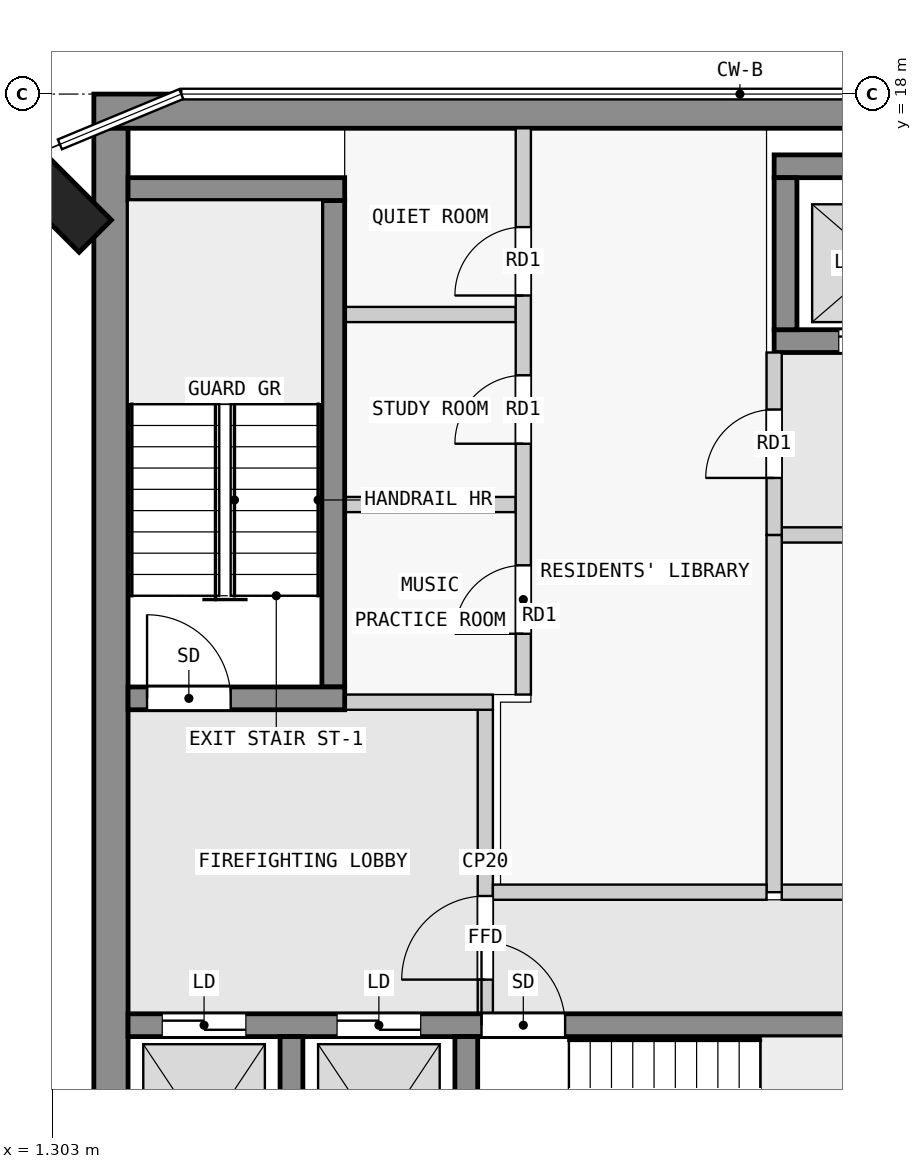
"""IFC4 building model, lengths in metres.
Left out: names, types, materials, properties, quantities, classifications, styles, units other than length and angle.
Written with IfcOpenShell. Run it as: python <this file> out.ifc"""

import sys

from ifc_helpers import new_model, si_unit, direction, frame, frame_2d, origin, origin_2d, place, context, subcontext, project, spatial, rectangle, extrude, element, fill, save


model = new_model("IFC4")
c1 = context("Model", 3, precision=1e-05, world=origin(), true_north=direction((0.0, 1.0)))
c2 = subcontext(c1, "Body", "Model", "MODEL_VIEW")
j1 = project(units=[si_unit("LENGTHUNIT", "METRE"), si_unit("PLANEANGLEUNIT", "RADIAN")], contexts=[c1])
p1 = place(None, origin())
s1 = spatial("IfcSite", under=j1, at=p1, CompositionType="ELEMENT")
p2 = place(p1, origin())
s2 = spatial("IfcBuilding", under=s1, at=p2, CompositionType="ELEMENT")
p3 = place(p2, frame((0.0, 0.0, 266.9)))
s3 = spatial("IfcBuildingStorey", under=s2, at=p3, CompositionType="ELEMENT", Elevation=266.9)
p4 = place(p3, frame((1.374, 16.626, 0.0), z_axis=(0.0, 0.0, 1.0), x_axis=(0.707106781187, 0.707106781187, 0.0)))
e1 = element("IfcColumn", 1, at=p4, inside=s3, PredefinedType="COLUMN", context=c2, shape_type="SweptSolid", body=[
    extrude(rectangle(XDim=0.6, YDim=1.4, at=origin_2d()), origin(), (0.0, 0.0, 1.0), 3.5),
])
p5 = place(p3, frame((1.85, 17.775, 0.0), z_axis=(0.0, 0.0, 1.0), x_axis=(1.0, 0.0, 0.0)))
e2 = element("IfcWall", 2, at=p5, inside=s3, PredefinedType="SHEAR", context=c2, shape_type="SweptSolid", body=[
    extrude(rectangle(XDim=20.65, YDim=0.45, at=frame_2d((10.325, 0.0))), origin(), (0.0, 0.0, 1.0), 3.25),
])
p6 = place(p3, frame((2.075, 2.5, 0.0), z_axis=(0.0, 0.0, 1.0), x_axis=(0.0, 1.0, 0.0)))
e3 = element("IfcWall", 3, at=p6, inside=s3, PredefinedType="SHEAR", context=c2, shape_type="SweptSolid", body=[
    extrude(rectangle(XDim=15.05, YDim=0.45, at=frame_2d((7.525, 0.0))), origin(), (0.0, 0.0, 1.0), 3.25),
])
for number, where, z_axis, x_axis in (
    (4, (4.45, 2.8, 0.0), (0.0, 0.0, 1.0), (0.0, 1.0, 0.0)),
    (5, (6.75, 2.8, 0.0), (0.0, 0.0, 1.0), (0.0, 1.0, 0.0)),
):
    element("IfcWall", number, at=place(p3, frame(where, z_axis=z_axis, x_axis=x_axis)), inside=s3, PredefinedType="SHEAR", context=c2, shape_type="SweptSolid", body=[
        extrude(rectangle(XDim=2.8, YDim=0.3, at=frame_2d((1.4, 0.0))), origin(), (0.0, 0.0, 1.0), 3.25),
    ])
p7 = place(p3, frame((2.3, 5.75, 0.0), z_axis=(0.0, 0.0, 1.0), x_axis=(1.0, 0.0, 0.0)))
e6 = element("IfcWall", 6, at=p7, inside=s3, PredefinedType="SHEAR", context=c2, shape_type="SweptSolid", body=[
    extrude(rectangle(XDim=18.8, YDim=0.3, at=frame_2d((9.4, 0.0))), origin(), (0.0, 0.0, 1.0), 3.25),
])
p8 = place(p7, frame((4.65, 0.0, 0.0)))
e7 = element("IfcOpeningElement", 7, at=p8, cuts=e6, PredefinedType="OPENING", context=c2, shape_type="SweptSolid", body=[
    extrude(rectangle(XDim=1.1, YDim=2.1, at=frame_2d((0.55, 1.05))), frame((0.0, 0.16, 0.0), z_axis=(0.0, -1.0, 0.0), x_axis=(1.0, 0.0, 0.0)), (0.0, 0.0, 1.0), 0.32),
])
p9 = place(p7, frame((0.45, 0.0, 0.0)))
e8 = element("IfcOpeningElement", 8, at=p9, cuts=e6, PredefinedType="OPENING", context=c2, shape_type="SweptSolid", body=[
    extrude(rectangle(XDim=1.1, YDim=2.1, at=frame_2d((0.55, 1.05))), frame((0.0, 0.16, 0.0), z_axis=(0.0, -1.0, 0.0), x_axis=(1.0, 0.0, 0.0)), (0.0, 0.0, 1.0), 0.32),
])
p10 = place(p7, frame((2.75, 0.0, 0.0)))
e9 = element("IfcOpeningElement", 9, at=p10, cuts=e6, PredefinedType="OPENING", context=c2, shape_type="SweptSolid", body=[
    extrude(rectangle(XDim=1.1, YDim=2.1, at=frame_2d((0.55, 1.05))), frame((0.0, 0.16, 0.0), z_axis=(0.0, -1.0, 0.0), x_axis=(1.0, 0.0, 0.0)), (0.0, 0.0, 1.0), 0.32),
])
p11 = place(p7, frame((11.95, 0.0, 0.0)))
e10 = element("IfcOpeningElement", 10, at=p11, cuts=e6, PredefinedType="OPENING", context=c2, shape_type="SweptSolid", body=[
    extrude(rectangle(XDim=0.9, YDim=2.1, at=frame_2d((0.45, 1.05))), frame((0.0, 0.16, 0.0), z_axis=(0.0, -1.0, 0.0), x_axis=(1.0, 0.0, 0.0)), (0.0, 0.0, 1.0), 0.32),
])
p12 = place(p7, frame((15.7, 0.0, 0.0)))
e11 = element("IfcOpeningElement", 11, at=p12, cuts=e6, PredefinedType="OPENING", context=c2, shape_type="SweptSolid", body=[
    extrude(rectangle(XDim=0.9, YDim=2.1, at=frame_2d((0.45, 1.05))), frame((0.0, 0.16, 0.0), z_axis=(0.0, -1.0, 0.0), x_axis=(1.0, 0.0, 0.0)), (0.0, 0.0, 1.0), 0.32),
])
p13 = place(p3, frame((2.3, 10.05, 0.0), z_axis=(0.0, 0.0, 1.0), x_axis=(1.0, 0.0, 0.0)))
e12 = element("IfcWall", 12, at=p13, inside=s3, PredefinedType="SHEAR", context=c2, shape_type="SweptSolid", body=[
    extrude(rectangle(XDim=2.85, YDim=0.3, at=frame_2d((1.425, 0.0))), origin(), (0.0, 0.0, 1.0), 3.25),
])
p14 = place(p13, frame((0.25, 0.0, 0.0)))
e13 = element("IfcOpeningElement", 13, at=p14, cuts=e12, PredefinedType="OPENING", context=c2, shape_type="SweptSolid", body=[
    extrude(rectangle(XDim=1.1, YDim=2.1, at=frame_2d((0.55, 1.05))), frame((0.0, 0.16, 0.0), z_axis=(0.0, -1.0, 0.0), x_axis=(1.0, 0.0, 0.0)), (0.0, 0.0, 1.0), 0.32),
])
p15 = place(p3, frame((5.0, 10.2, 0.0), z_axis=(0.0, 0.0, 1.0), x_axis=(0.0, 1.0, 0.0)))
e14 = element("IfcWall", 14, at=p15, inside=s3, PredefinedType="SHEAR", context=c2, shape_type="SweptSolid", body=[
    extrude(rectangle(XDim=6.4, YDim=0.3, at=frame_2d((3.2, 0.0))), origin(), (0.0, 0.0, 1.0), 3.25),
])
p16 = place(p3, frame((2.3, 16.75, 0.0), z_axis=(0.0, 0.0, 1.0), x_axis=(1.0, 0.0, 0.0)))
e15 = element("IfcWall", 15, at=p16, inside=s3, PredefinedType="SHEAR", context=c2, shape_type="SweptSolid", body=[
    extrude(rectangle(XDim=2.85, YDim=0.3, at=frame_2d((1.425, 0.0))), origin(), (0.0, 0.0, 1.0), 3.25),
])
p17 = place(p3, frame((10.8, 17.05, 0.0), z_axis=(0.0, 0.0, 1.0), x_axis=(1.0, 0.0, 0.0)))
e16 = element("IfcWall", 16, at=p17, inside=s3, PredefinedType="SHEAR", context=c2, shape_type="SweptSolid", body=[
    extrude(rectangle(XDim=7.8, YDim=0.3, at=frame_2d((3.9, 0.0))), origin(), (0.0, 0.0, 1.0), 3.25),
])
p18 = place(p3, frame((10.8, 14.75, 0.0), z_axis=(0.0, 0.0, 1.0), x_axis=(1.0, 0.0, 0.0)))
e17 = element("IfcWall", 17, at=p18, inside=s3, PredefinedType="SHEAR", context=c2, shape_type="SweptSolid", body=[
    extrude(rectangle(XDim=7.8, YDim=0.3, at=frame_2d((3.9, 0.0))), origin(), (0.0, 0.0, 1.0), 3.25),
])
p19 = place(p18, frame((0.85, 0.0, 0.0)))
e18 = element("IfcOpeningElement", 18, at=p19, cuts=e17, PredefinedType="OPENING", context=c2, shape_type="SweptSolid", body=[
    extrude(rectangle(XDim=1.1, YDim=2.1, at=frame_2d((0.55, 1.05))), frame((0.0, 0.16, 0.0), z_axis=(0.0, -1.0, 0.0), x_axis=(1.0, 0.0, 0.0)), (0.0, 0.0, 1.0), 0.32),
])
p20 = place(p18, frame((3.35, 0.0, 0.0)))
e19 = element("IfcOpeningElement", 19, at=p20, cuts=e17, PredefinedType="OPENING", context=c2, shape_type="SweptSolid", body=[
    extrude(rectangle(XDim=1.1, YDim=2.1, at=frame_2d((0.55, 1.05))), frame((0.0, 0.16, 0.0), z_axis=(0.0, -1.0, 0.0), x_axis=(1.0, 0.0, 0.0)), (0.0, 0.0, 1.0), 0.32),
])
p21 = place(p18, frame((5.85, 0.0, 0.0)))
e20 = element("IfcOpeningElement", 20, at=p21, cuts=e17, PredefinedType="OPENING", context=c2, shape_type="SweptSolid", body=[
    extrude(rectangle(XDim=1.1, YDim=2.1, at=frame_2d((0.55, 1.05))), frame((0.0, 0.16, 0.0), z_axis=(0.0, -1.0, 0.0), x_axis=(1.0, 0.0, 0.0)), (0.0, 0.0, 1.0), 0.32),
])
p22 = place(p3, frame((10.95, 14.9, 0.0), z_axis=(0.0, 0.0, 1.0), x_axis=(0.0, 1.0, 0.0)))
e21 = element("IfcWall", 21, at=p22, inside=s3, PredefinedType="SHEAR", context=c2, shape_type="SweptSolid", body=[
    extrude(rectangle(XDim=2.0, YDim=0.3, at=frame_2d((1.0, 0.0))), origin(), (0.0, 0.0, 1.0), 3.25),
])
p23 = place(p3, frame((7.0, 5.9, 0.0), z_axis=(0.0, 0.0, 1.0), x_axis=(0.0, 1.0, 0.0)))
e22 = element("IfcWall", 22, at=p23, inside=s3, PredefinedType="PARTITIONING", context=c2, shape_type="SweptSolid", body=[
    extrude(rectangle(XDim=4.0, YDim=0.2, at=frame_2d((2.0, 0.0))), origin(), (0.0, 0.0, 1.0), 3.25),
])
p24 = place(p23, frame((0.45, 0.0, 0.0)))
e23 = element("IfcOpeningElement", 23, at=p24, cuts=e22, PredefinedType="OPENING", context=c2, shape_type="SweptSolid", body=[
    extrude(rectangle(XDim=1.1, YDim=2.1, at=frame_2d((0.55, 1.05))), frame((0.0, 0.11, 0.0), z_axis=(0.0, -1.0, 0.0), x_axis=(1.0, 0.0, 0.0)), (0.0, 0.0, 1.0), 0.22),
])
p25 = place(p3, frame((5.15, 10.0, 0.0), z_axis=(0.0, 0.0, 1.0), x_axis=(1.0, 0.0, 0.0)))
e24 = element("IfcWall", 24, at=p25, inside=s3, PredefinedType="PARTITIONING", context=c2, shape_type="SweptSolid", body=[
    extrude(rectangle(XDim=1.95, YDim=0.2, at=frame_2d((0.975, 0.0))), origin(), (0.0, 0.0, 1.0), 3.25),
])
p26 = place(p3, frame((7.1, 7.5, 0.0), z_axis=(0.0, 0.0, 1.0), x_axis=(1.0, 0.0, 0.0)))
e25 = element("IfcWall", 25, at=p26, inside=s3, PredefinedType="PARTITIONING", context=c2, shape_type="SweptSolid", body=[
    extrude(rectangle(XDim=3.6, YDim=0.2, at=frame_2d((1.8, 0.0))), origin(), (0.0, 0.0, 1.0), 3.25),
])
p27 = place(p3, frame((10.8, 12.2, 0.0), z_axis=(0.0, 0.0, 1.0), x_axis=(0.0, 1.0, 0.0)))
e26 = element("IfcWall", 26, at=p27, inside=s3, PredefinedType="PARTITIONING", context=c2, shape_type="SweptSolid", body=[
    extrude(rectangle(XDim=2.4, YDim=0.2, at=frame_2d((1.2, 0.0))), origin(), (0.0, 0.0, 1.0), 3.25),
])
p28 = place(p27, frame((0.75, 0.0, 0.0)))
e27 = element("IfcOpeningElement", 27, at=p28, cuts=e26, PredefinedType="OPENING", context=c2, shape_type="SweptSolid", body=[
    extrude(rectangle(XDim=0.9, YDim=2.1, at=frame_2d((0.45, 1.05))), frame((0.0, 0.11, 0.0), z_axis=(0.0, -1.0, 0.0), x_axis=(1.0, 0.0, 0.0)), (0.0, 0.0, 1.0), 0.22),
])
p29 = place(p3, frame((10.8, 7.5, 0.0), z_axis=(0.0, 0.0, 1.0), x_axis=(0.0, 1.0, 0.0)))
e28 = element("IfcWall", 28, at=p29, inside=s3, PredefinedType="PARTITIONING", context=c2, shape_type="SweptSolid", body=[
    extrude(rectangle(XDim=4.7, YDim=0.2, at=frame_2d((2.35, 0.0))), origin(), (0.0, 0.0, 1.0), 3.25),
])
p30 = place(p3, frame((10.9, 7.5, 0.0), z_axis=(0.0, 0.0, 1.0), x_axis=(1.0, 0.0, 0.0)))
e29 = element("IfcWall", 29, at=p30, inside=s3, PredefinedType="PARTITIONING", context=c2, shape_type="SweptSolid", body=[
    extrude(rectangle(XDim=8.65, YDim=0.2, at=frame_2d((4.325, 0.0))), origin(), (0.0, 0.0, 1.0), 3.25),
])
p31 = place(p3, frame((10.9, 12.2, 0.0), z_axis=(0.0, 0.0, 1.0), x_axis=(1.0, 0.0, 0.0)))
e30 = element("IfcWall", 30, at=p31, inside=s3, PredefinedType="PARTITIONING", context=c2, shape_type="SweptSolid", body=[
    extrude(rectangle(XDim=8.65, YDim=0.2, at=frame_2d((4.325, 0.0))), origin(), (0.0, 0.0, 1.0), 3.25),
])
p32 = place(p31, frame((1.45, 0.0, 0.0)))
e31 = element("IfcOpeningElement", 31, at=p32, cuts=e30, PredefinedType="OPENING", context=c2, shape_type="SweptSolid", body=[
    extrude(rectangle(XDim=0.9, YDim=2.1, at=frame_2d((0.45, 1.05))), frame((0.0, 0.11, 0.0), z_axis=(0.0, -1.0, 0.0), x_axis=(1.0, 0.0, 0.0)), (0.0, 0.0, 1.0), 0.22),
])
p33 = place(p31, frame((5.875, 0.0, 0.0)))
e32 = element("IfcOpeningElement", 32, at=p33, cuts=e30, PredefinedType="OPENING", context=c2, shape_type="SweptSolid", body=[
    extrude(rectangle(XDim=0.9, YDim=2.1, at=frame_2d((0.45, 1.05))), frame((0.0, 0.11, 0.0), z_axis=(0.0, -1.0, 0.0), x_axis=(1.0, 0.0, 0.0)), (0.0, 0.0, 1.0), 0.22),
])
p34 = place(p3, frame((7.5, 10.1, 0.0), z_axis=(0.0, 0.0, 1.0), x_axis=(0.0, 1.0, 0.0)))
e33 = element("IfcWall", 33, at=p34, inside=s3, PredefinedType="PARTITIONING", context=c2, shape_type="SweptSolid", body=[
    extrude(rectangle(XDim=7.45, YDim=0.2, at=frame_2d((3.725, 0.0))), origin(), (0.0, 0.0, 1.0), 3.25),
])
p35 = place(p34, frame((0.8, 0.0, 0.0)))
e34 = element("IfcOpeningElement", 34, at=p35, cuts=e33, PredefinedType="OPENING", context=c2, shape_type="SweptSolid", body=[
    extrude(rectangle(XDim=0.9, YDim=2.1, at=frame_2d((0.45, 1.05))), frame((0.0, 0.11, 0.0), z_axis=(0.0, -1.0, 0.0), x_axis=(1.0, 0.0, 0.0)), (0.0, 0.0, 1.0), 0.22),
])
p36 = place(p34, frame((3.3, 0.0, 0.0)))
e35 = element("IfcOpeningElement", 35, at=p36, cuts=e33, PredefinedType="OPENING", context=c2, shape_type="SweptSolid", body=[
    extrude(rectangle(XDim=0.9, YDim=2.1, at=frame_2d((0.45, 1.05))), frame((0.0, 0.11, 0.0), z_axis=(0.0, -1.0, 0.0), x_axis=(1.0, 0.0, 0.0)), (0.0, 0.0, 1.0), 0.22),
])
p37 = place(p34, frame((5.25, 0.0, 0.0)))
e36 = element("IfcOpeningElement", 36, at=p37, cuts=e33, PredefinedType="OPENING", context=c2, shape_type="SweptSolid", body=[
    extrude(rectangle(XDim=0.9, YDim=2.1, at=frame_2d((0.45, 1.05))), frame((0.0, 0.11, 0.0), z_axis=(0.0, -1.0, 0.0), x_axis=(1.0, 0.0, 0.0)), (0.0, 0.0, 1.0), 0.22),
])
for number, where, z_axis, x_axis in (
    (37, (5.15, 12.6, 0.0), (0.0, 0.0, 1.0), (1.0, 0.0, 0.0)),
    (38, (5.15, 15.1, 0.0), (0.0, 0.0, 1.0), (1.0, 0.0, 0.0)),
):
    element("IfcWall", number, at=place(p3, frame(where, z_axis=z_axis, x_axis=x_axis)), inside=s3, PredefinedType="PARTITIONING", context=c2, shape_type="SweptSolid", body=[
        extrude(rectangle(XDim=2.25, YDim=0.2, at=frame_2d((1.125, 0.0))), origin(), (0.0, 0.0, 1.0), 3.25),
    ])
p38 = place(p24, origin())
e39 = element("IfcDoor", 39, at=p38, inside=s3, OperationType="SINGLE_SWING_LEFT", PredefinedType="DOOR", context=c2, shape_type="SweptSolid", body=[
    extrude(rectangle(XDim=1.1, YDim=2.1, at=frame_2d((0.55, 1.05))), frame((0.0, 0.025, 0.0), z_axis=(0.0, -1.0, 0.0), x_axis=(1.0, 0.0, 0.0)), (0.0, 0.0, 1.0), 0.05),
])
fill(e23, e39)
p39 = place(p14, origin())
e40 = element("IfcDoor", 40, at=p39, inside=s3, OperationType="SINGLE_SWING_RIGHT", PredefinedType="DOOR", context=c2, shape_type="SweptSolid", body=[
    extrude(rectangle(XDim=1.1, YDim=2.1, at=frame_2d((0.55, 1.05))), frame((0.0, 0.025, 0.0), z_axis=(0.0, -1.0, 0.0), x_axis=(1.0, 0.0, 0.0)), (0.0, 0.0, 1.0), 0.05),
])
fill(e13, e40)
p40 = place(p28, origin())
e41 = element("IfcDoor", 41, at=p40, inside=s3, OperationType="SINGLE_SWING_LEFT", PredefinedType="DOOR", context=c2, shape_type="SweptSolid", body=[
    extrude(rectangle(XDim=0.9, YDim=2.1, at=frame_2d((0.45, 1.05))), frame((0.0, 0.025, 0.0), z_axis=(0.0, -1.0, 0.0), x_axis=(1.0, 0.0, 0.0)), (0.0, 0.0, 1.0), 0.05),
])
fill(e27, e41)
p41 = place(p8, origin())
e42 = element("IfcDoor", 42, at=p41, inside=s3, OperationType="SINGLE_SWING_LEFT", PredefinedType="DOOR", context=c2, shape_type="SweptSolid", body=[
    extrude(rectangle(XDim=1.1, YDim=2.1, at=frame_2d((0.55, 1.05))), frame((0.0, 0.025, 0.0), z_axis=(0.0, -1.0, 0.0), x_axis=(1.0, 0.0, 0.0)), (0.0, 0.0, 1.0), 0.05),
])
fill(e7, e42)
p42 = place(p9, origin())
e43 = element("IfcDoor", 43, at=p42, inside=s3, OperationType="DOUBLE_DOOR_SLIDING", PredefinedType="DOOR", context=c2, shape_type="SweptSolid", body=[
    extrude(rectangle(XDim=1.1, YDim=2.1, at=frame_2d((0.55, 1.05))), frame((0.0, 0.025, 0.0), z_axis=(0.0, -1.0, 0.0), x_axis=(1.0, 0.0, 0.0)), (0.0, 0.0, 1.0), 0.05),
])
fill(e8, e43)
p43 = place(p10, origin())
e44 = element("IfcDoor", 44, at=p43, inside=s3, OperationType="DOUBLE_DOOR_SLIDING", PredefinedType="DOOR", context=c2, shape_type="SweptSolid", body=[
    extrude(rectangle(XDim=1.1, YDim=2.1, at=frame_2d((0.55, 1.05))), frame((0.0, 0.025, 0.0), z_axis=(0.0, -1.0, 0.0), x_axis=(1.0, 0.0, 0.0)), (0.0, 0.0, 1.0), 0.05),
])
fill(e9, e44)
p44 = place(p19, origin())
e45 = element("IfcDoor", 45, at=p44, inside=s3, OperationType="DOUBLE_DOOR_SLIDING", PredefinedType="DOOR", context=c2, shape_type="SweptSolid", body=[
    extrude(rectangle(XDim=1.1, YDim=2.1, at=frame_2d((0.55, 1.05))), frame((0.0, 0.025, 0.0), z_axis=(0.0, -1.0, 0.0), x_axis=(1.0, 0.0, 0.0)), (0.0, 0.0, 1.0), 0.05),
])
fill(e18, e45)
p45 = place(p35, origin())
e46 = element("IfcDoor", 46, at=p45, inside=s3, OperationType="SINGLE_SWING_RIGHT", PredefinedType="DOOR", context=c2, shape_type="SweptSolid", body=[
    extrude(rectangle(XDim=0.9, YDim=2.1, at=frame_2d((0.45, 1.05))), frame((0.0, 0.025, 0.0), z_axis=(0.0, -1.0, 0.0), x_axis=(1.0, 0.0, 0.0)), (0.0, 0.0, 1.0), 0.05),
])
fill(e34, e46)
p46 = place(p36, origin())
e47 = element("IfcDoor", 47, at=p46, inside=s3, OperationType="SINGLE_SWING_RIGHT", PredefinedType="DOOR", context=c2, shape_type="SweptSolid", body=[
    extrude(rectangle(XDim=0.9, YDim=2.1, at=frame_2d((0.45, 1.05))), frame((0.0, 0.025, 0.0), z_axis=(0.0, -1.0, 0.0), x_axis=(1.0, 0.0, 0.0)), (0.0, 0.0, 1.0), 0.05),
])
fill(e35, e47)
p47 = place(p37, origin())
e48 = element("IfcDoor", 48, at=p47, inside=s3, OperationType="SINGLE_SWING_RIGHT", PredefinedType="DOOR", context=c2, shape_type="SweptSolid", body=[
    extrude(rectangle(XDim=0.9, YDim=2.1, at=frame_2d((0.45, 1.05))), frame((0.0, 0.025, 0.0), z_axis=(0.0, -1.0, 0.0), x_axis=(1.0, 0.0, 0.0)), (0.0, 0.0, 1.0), 0.05),
])
fill(e36, e48)
save(model, sys.argv[1])
